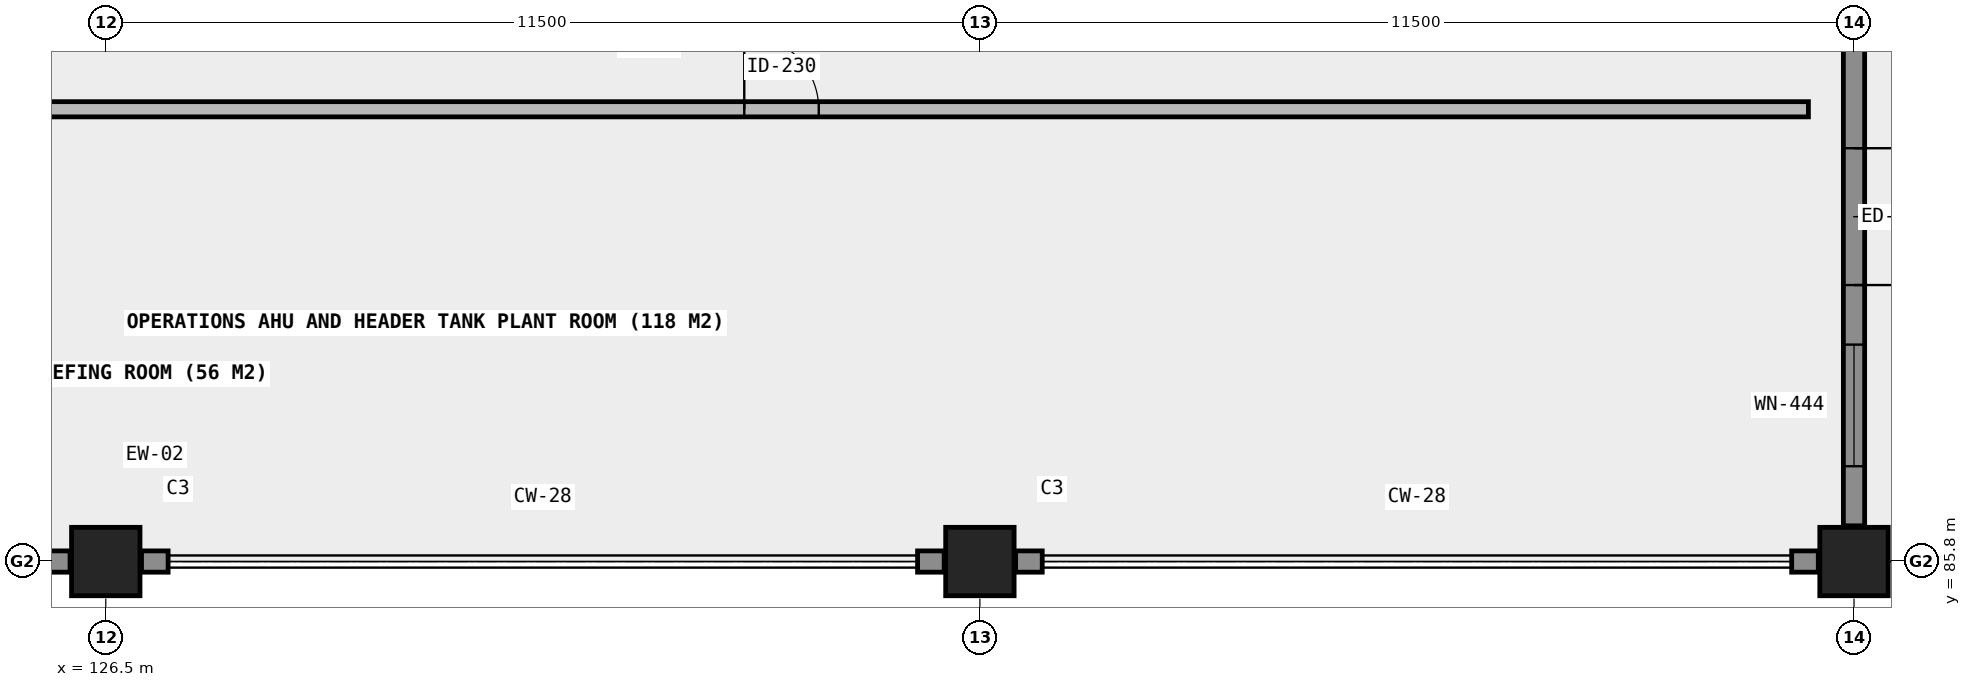
"""IFC4 building model, lengths in metres.
Left out: names, types, materials, properties, quantities, classifications, styles, units other than length and angle.
Written with IfcOpenShell. Run it as: python <this file> out.ifc"""

import sys

from ifc_helpers import new_model, si_unit, direction, frame, frame_2d, origin, origin_2d, place, context, subcontext, project, spatial, rectangle, extrude, element, fill, save


model = new_model("IFC4")
c1 = context("Model", 3, precision=1e-05, world=origin(), true_north=direction((0.0, 1.0)))
c2 = subcontext(c1, "Body", "Model", "MODEL_VIEW")
j1 = project(units=[si_unit("LENGTHUNIT", "METRE"), si_unit("PLANEANGLEUNIT", "RADIAN")], contexts=[c1])
p1 = place(None, origin())
s1 = spatial("IfcSite", under=j1, at=p1, CompositionType="ELEMENT")
p2 = place(p1, origin())
s2 = spatial("IfcBuilding", under=s1, at=p2, CompositionType="ELEMENT")
p3 = place(p2, frame((0.0, 0.0, 22.46)))
s3 = spatial("IfcBuildingStorey", under=s2, at=p3, CompositionType="ELEMENT", Elevation=22.46)
for number, where, z_axis, x_axis in (
    (1, (126.5, 85.8, 0.0), (0.0, 0.0, 1.0), (1.0, 0.0, 0.0)),
    (2, (138.0, 85.8, 0.0), (0.0, 0.0, 1.0), (1.0, 0.0, 0.0)),
    (3, (149.5, 85.8, 0.0), (0.0, 0.0, 1.0), (1.0, 0.0, 0.0)),
):
    element("IfcColumn", number, at=place(p3, frame(where, z_axis=z_axis, x_axis=x_axis)), inside=s3, PredefinedType="COLUMN", context=c2, shape_type="SweptSolid", body=[
        extrude(rectangle(XDim=0.9, YDim=0.9, at=origin_2d()), origin(), (0.0, 0.0, 1.0), 4.44),
    ])
p4 = place(p3, frame((115.47, 85.8, 0.0), z_axis=(0.0, 0.0, 1.0), x_axis=(1.0, 0.0, 0.0)))
e4 = element("IfcWall", 4, at=p4, inside=s3, PredefinedType="SOLIDWALL", context=c2, shape_type="SweptSolid", body=[
    extrude(rectangle(XDim=10.56, YDim=0.28, at=frame_2d((5.28, 0.0))), origin(), (0.0, 0.0, 1.0), 3.36),
])
p5 = place(p4, frame((2.453, 0.0, 0.85)))
e5 = element("IfcOpeningElement", 5, at=p5, cuts=e4, PredefinedType="OPENING", context=c2, shape_type="SweptSolid", body=[
    extrude(rectangle(XDim=1.6, YDim=1.6, at=frame_2d((0.8, 0.8))), frame((0.0, 0.15, 0.0), z_axis=(0.0, -1.0, 0.0), x_axis=(1.0, 0.0, 0.0)), (0.0, 0.0, 1.0), 0.3),
])
p6 = place(p4, frame((6.507, 0.0, 0.85)))
e6 = element("IfcOpeningElement", 6, at=p6, cuts=e4, PredefinedType="OPENING", context=c2, shape_type="SweptSolid", body=[
    extrude(rectangle(XDim=1.6, YDim=1.6, at=frame_2d((0.8, 0.8))), frame((0.0, 0.15, 0.0), z_axis=(0.0, -1.0, 0.0), x_axis=(1.0, 0.0, 0.0)), (0.0, 0.0, 1.0), 0.3),
])
for number, where, z_axis, x_axis in (
    (7, (126.97, 85.8, 0.0), (0.0, 0.0, 1.0), (1.0, 0.0, 0.0)),
    (8, (137.18, 85.8, 0.0), (0.0, 0.0, 1.0), (1.0, 0.0, 0.0)),
    (9, (138.47, 85.8, 0.0), (0.0, 0.0, 1.0), (1.0, 0.0, 0.0)),
    (10, (148.68, 85.8, 0.0), (0.0, 0.0, 1.0), (1.0, 0.0, 0.0)),
):
    element("IfcWall", number, at=place(p3, frame(where, z_axis=z_axis, x_axis=x_axis)), inside=s3, PredefinedType="SOLIDWALL", context=c2, shape_type="SweptSolid", body=[
        extrude(rectangle(XDim=0.35, YDim=0.28, at=frame_2d((0.175, 0.0))), origin(), (0.0, 0.0, 1.0), 4.15),
    ])
p7 = place(p3, frame((149.5, 86.27, 0.0), z_axis=(0.0, 0.0, 1.0), x_axis=(0.0, 1.0, 0.0)))
e11 = element("IfcWall", 11, at=p7, inside=s3, PredefinedType="SOLIDWALL", context=c2, shape_type="SweptSolid", body=[
    extrude(rectangle(XDim=8.135, YDim=0.28, at=frame_2d((4.067, 0.0))), origin(), (0.0, 0.0, 1.0), 3.36),
])
p8 = place(p7, frame((3.167, 0.0, 0.0)))
e12 = element("IfcOpeningElement", 12, at=p8, cuts=e11, PredefinedType="OPENING", context=c2, shape_type="SweptSolid", body=[
    extrude(rectangle(XDim=1.8, YDim=2.25, at=frame_2d((0.9, 1.125))), frame((0.0, 0.15, 0.0), z_axis=(0.0, -1.0, 0.0), x_axis=(1.0, 0.0, 0.0)), (0.0, 0.0, 1.0), 0.3),
])
p9 = place(p7, frame((0.784, 0.0, 0.78)))
e13 = element("IfcOpeningElement", 13, at=p9, cuts=e11, PredefinedType="OPENING", context=c2, shape_type="SweptSolid", body=[
    extrude(rectangle(XDim=1.6, YDim=1.6, at=frame_2d((0.8, 0.8))), frame((0.0, 0.15, 0.0), z_axis=(0.0, -1.0, 0.0), x_axis=(1.0, 0.0, 0.0)), (0.0, 0.0, 1.0), 0.3),
])
p10 = place(p3, frame((118.4, 91.75, 0.0), z_axis=(0.0, 0.0, 1.0), x_axis=(1.0, 0.0, 0.0)))
e14 = element("IfcWall", 14, at=p10, inside=s3, PredefinedType="PARTITIONING", context=c2, shape_type="SweptSolid", body=[
    extrude(rectangle(XDim=30.5, YDim=0.2, at=frame_2d((15.25, 0.0))), origin(), (0.0, 0.0, 1.0), 4.14),
])
p11 = place(p10, frame((4.2, 0.0, 0.0)))
e15 = element("IfcOpeningElement", 15, at=p11, cuts=e14, PredefinedType="OPENING", context=c2, shape_type="SweptSolid", body=[
    extrude(rectangle(XDim=1.8, YDim=2.2, at=frame_2d((0.9, 1.1))), frame((0.0, 0.11, 0.0), z_axis=(0.0, -1.0, 0.0), x_axis=(1.0, 0.0, 0.0)), (0.0, 0.0, 1.0), 0.22),
])
p12 = place(p10, frame((16.5, 0.0, 0.0)))
e16 = element("IfcOpeningElement", 16, at=p12, cuts=e14, PredefinedType="OPENING", context=c2, shape_type="SweptSolid", body=[
    extrude(rectangle(XDim=0.98, YDim=2.15, at=frame_2d((0.49, 1.075))), frame((0.0, 0.11, 0.0), z_axis=(0.0, -1.0, 0.0), x_axis=(1.0, 0.0, 0.0)), (0.0, 0.0, 1.0), 0.22),
])
p13 = place(p8, frame((0.9, 0.0, 0.0), z_axis=(0.0, 0.0, 1.0), x_axis=(-1.0, 0.0, 0.0)))
e17 = element("IfcDoor", 17, at=p13, inside=s3, OperationType="DOUBLE_DOOR_SINGLE_SWING", PredefinedType="DOOR", context=c2, shape_type="SweptSolid", body=[
    extrude(rectangle(XDim=1.8, YDim=2.25, at=frame_2d((0.0, 1.125))), frame((0.0, 0.025, 0.0), z_axis=(0.0, -1.0, 0.0), x_axis=(1.0, 0.0, 0.0)), (0.0, 0.0, 1.0), 0.05),
])
fill(e12, e17)
p14 = place(p9, origin())
e18 = element("IfcWindow", 18, at=p14, inside=s3, PartitioningType="SINGLE_PANEL", PredefinedType="WINDOW", context=c2, shape_type="SweptSolid", body=[
    extrude(rectangle(XDim=1.6, YDim=1.6, at=frame_2d((0.8, 0.8))), frame((0.0, 0.03, 0.0), z_axis=(0.0, -1.0, 0.0), x_axis=(1.0, 0.0, 0.0)), (0.0, 0.0, 1.0), 0.06),
])
fill(e13, e18)
p15 = place(p12, origin())
e19 = element("IfcDoor", 19, at=p15, inside=s3, OperationType="SINGLE_SWING_LEFT", PredefinedType="DOOR", context=c2, shape_type="SweptSolid", body=[
    extrude(rectangle(XDim=0.98, YDim=2.15, at=frame_2d((0.49, 1.075))), frame((0.0, 0.025, 0.0), z_axis=(0.0, -1.0, 0.0), x_axis=(1.0, 0.0, 0.0)), (0.0, 0.0, 1.0), 0.05),
])
fill(e16, e19)
save(model, sys.argv[1])
